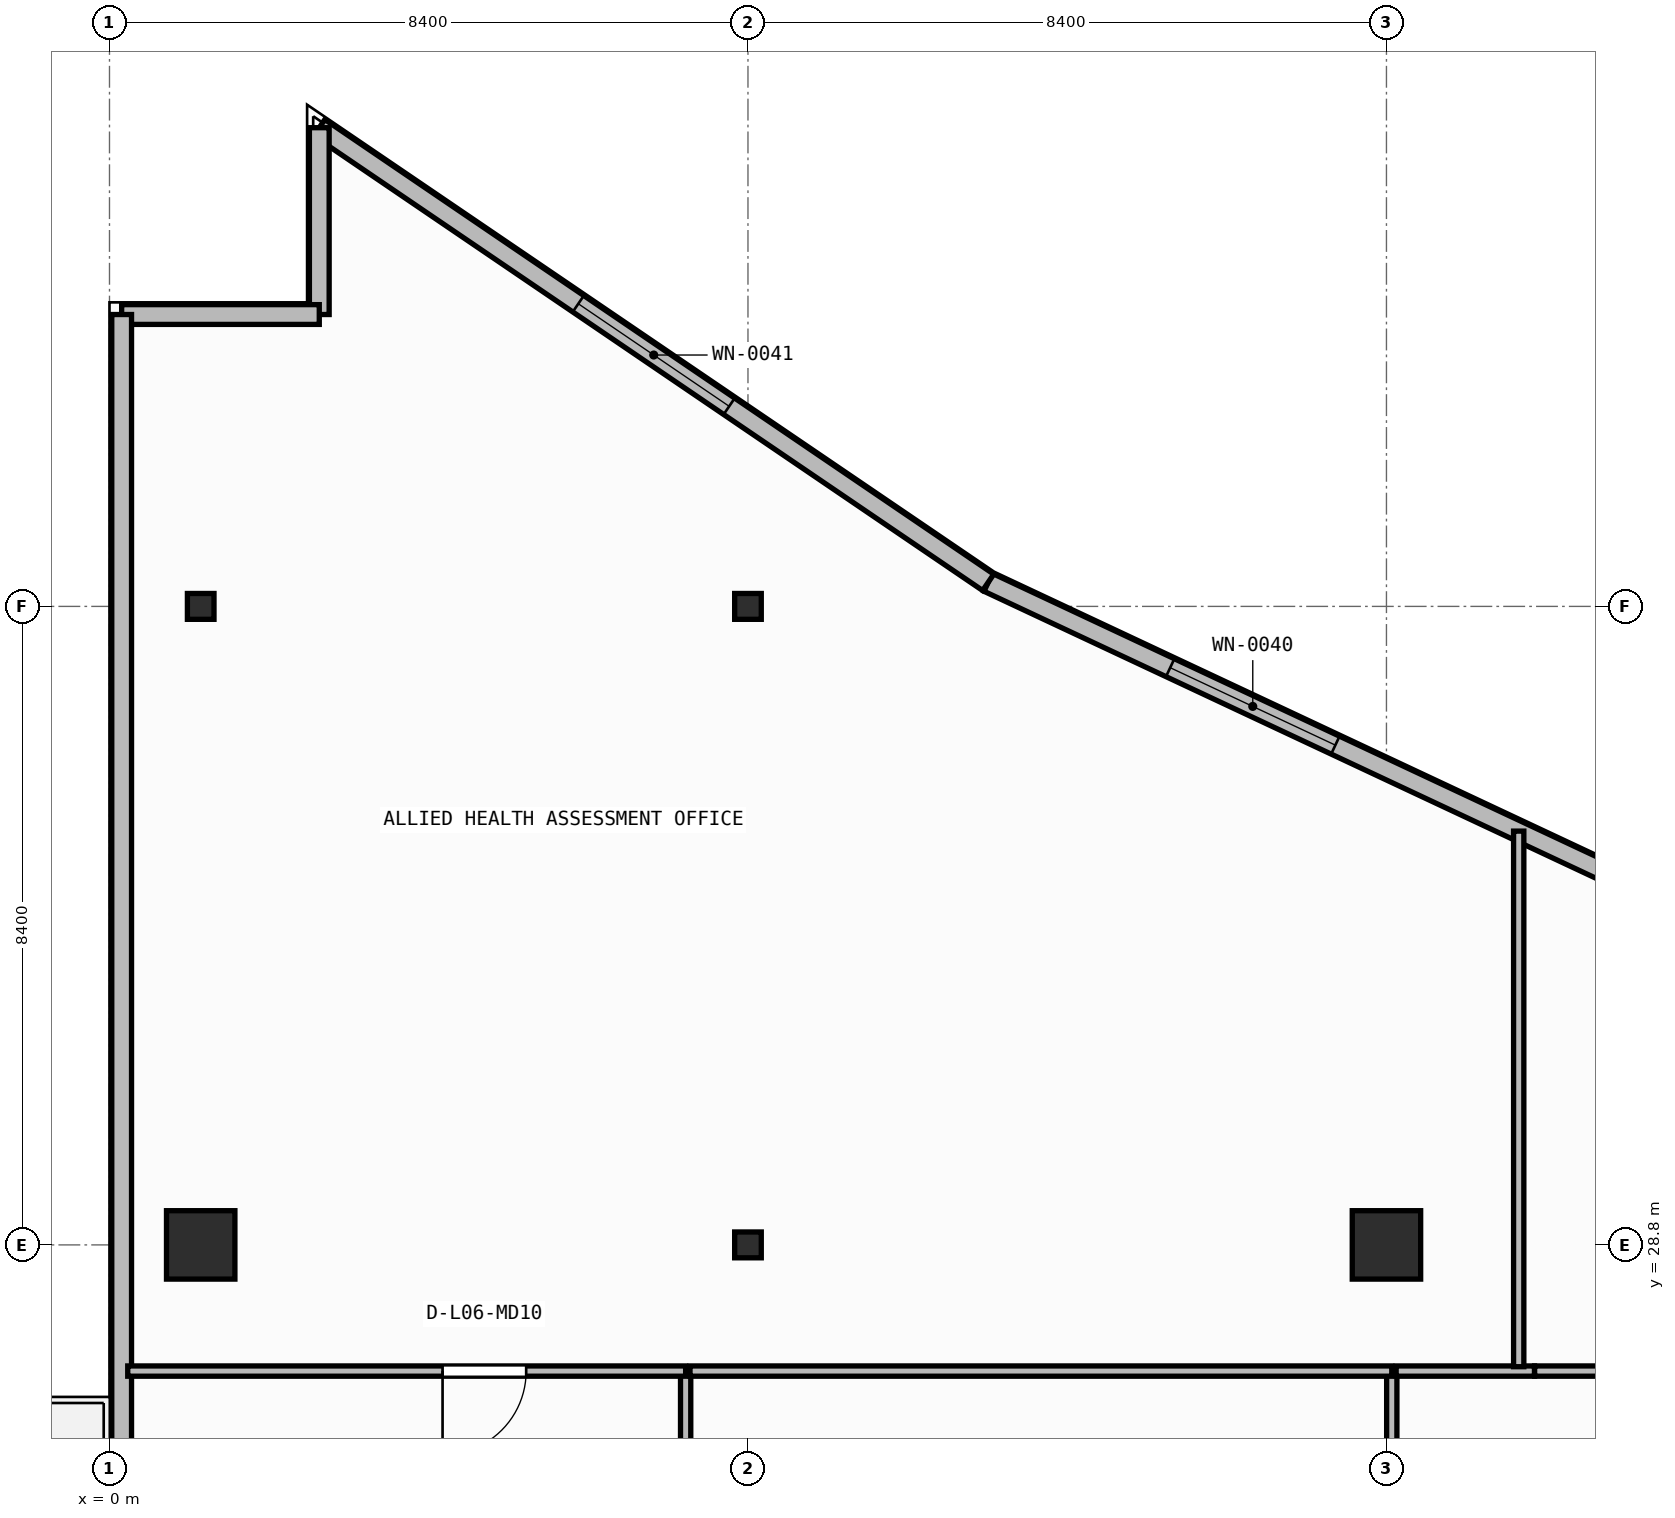
"""IFC4 building model, lengths in metres.
Left out: names, types, materials, properties, quantities, classifications, styles, units other than length and angle.
Written with IfcOpenShell. Run it as: python <this file> out.ifc"""

import sys

from ifc_helpers import new_model, si_unit, direction, frame, frame_2d, origin, origin_2d, place, context, subcontext, project, spatial, rectangle, i_section, extrude, element, fill, save


model = new_model("IFC4")
c1 = context("Model", 3, precision=1e-05, world=origin(), true_north=direction((0.0, 1.0)))
c2 = subcontext(c1, "Body", "Model", "MODEL_VIEW")
j1 = project(units=[si_unit("LENGTHUNIT", "METRE"), si_unit("PLANEANGLEUNIT", "RADIAN")], contexts=[c1])
p1 = place(None, origin())
s1 = spatial("IfcSite", under=j1, at=p1, CompositionType="ELEMENT")
p2 = place(p1, origin())
s2 = spatial("IfcBuilding", under=s1, at=p2, CompositionType="ELEMENT")
p3 = place(p2, frame((0.0, 0.0, 26.45)))
s3 = spatial("IfcBuildingStorey", under=s2, at=p3, CompositionType="ELEMENT", Elevation=26.45)
p4 = place(p3, frame((1.2, 28.8, 0.0), z_axis=(0.0, 0.0, 1.0), x_axis=(1.0, 0.0, 0.0)))
e1 = element("IfcColumn", 1, at=p4, inside=s3, PredefinedType="COLUMN", context=c2, shape_type="SweptSolid", body=[
    extrude(rectangle(XDim=0.9, YDim=0.9, at=origin_2d()), origin(), (0.0, 0.0, 1.0), 3.95),
])
p5 = place(p3, frame((8.4, 28.8, 0.0), z_axis=(0.0, 0.0, 1.0), x_axis=(1.0, 0.0, 0.0)))
e2 = element("IfcColumn", 2, at=p5, inside=s3, PredefinedType="COLUMN", context=c2, shape_type="SweptSolid", body=[
    extrude(i_section(OverallWidth=0.35, OverallDepth=0.34, WebThickness=0.016, FlangeThickness=0.028, at=origin_2d()), origin(), (0.0, 0.0, 1.0), 3.95),
])
p6 = place(p3, frame((16.8, 28.8, 0.0), z_axis=(0.0, 0.0, 1.0), x_axis=(1.0, 0.0, 0.0)))
e3 = element("IfcColumn", 3, at=p6, inside=s3, PredefinedType="COLUMN", context=c2, shape_type="SweptSolid", body=[
    extrude(rectangle(XDim=0.9, YDim=0.9, at=origin_2d()), origin(), (0.0, 0.0, 1.0), 3.95),
])
for number, where, z_axis, x_axis in (
    (4, (1.2, 37.2, 0.0), (0.0, 0.0, 1.0), (1.0, 0.0, 0.0)),
    (5, (8.4, 37.2, 0.0), (0.0, 0.0, 1.0), (1.0, 0.0, 0.0)),
):
    element("IfcColumn", number, at=place(p3, frame(where, z_axis=z_axis, x_axis=x_axis)), inside=s3, PredefinedType="COLUMN", context=c2, shape_type="SweptSolid", body=[
        extrude(i_section(OverallWidth=0.35, OverallDepth=0.34, WebThickness=0.016, FlangeThickness=0.028, at=origin_2d()), origin(), (0.0, 0.0, 1.0), 3.95),
    ])
p7 = place(p3, frame((24.408, 31.492, 0.0), z_axis=(0.0, 0.0, 1.0), x_axis=(-0.905396522918, 0.424566998585, 0.0)))
e6 = element("IfcWall", 6, at=p7, inside=s3, PredefinedType="STANDARD", context=c2, shape_type="SweptSolid", body=[
    extrude(rectangle(XDim=14.189, YDim=0.26, at=frame_2d((7.095, 0.0))), origin(), (0.0, 0.0, 1.0), 3.71),
])
p8 = place(p7, frame((9.145, 0.0, 0.9)))
e7 = element("IfcOpeningElement", 7, at=p8, cuts=e6, PredefinedType="OPENING", context=c2, shape_type="SweptSolid", body=[
    extrude(rectangle(XDim=2.4, YDim=1.65, at=frame_2d((1.2, 0.825))), frame((0.0, 0.14, 0.0), z_axis=(0.0, -1.0, 0.0), x_axis=(1.0, 0.0, 0.0)), (0.0, 0.0, 1.0), 0.28),
])
p9 = place(p3, frame((11.561, 37.517, 0.0), z_axis=(0.0, 0.0, 1.0), x_axis=(-0.827064743936, 0.562106670782, 0.0)))
e8 = element("IfcWall", 8, at=p9, inside=s3, PredefinedType="STANDARD", context=c2, shape_type="SweptSolid", body=[
    extrude(rectangle(XDim=10.641, YDim=0.26, at=frame_2d((5.32, 0.0))), origin(), (0.0, 0.0, 1.0), 3.71),
])
p10 = place(p9, frame((4.12, 0.0, 0.9)))
e9 = element("IfcOpeningElement", 9, at=p10, cuts=e8, PredefinedType="OPENING", context=c2, shape_type="SweptSolid", body=[
    extrude(rectangle(XDim=2.4, YDim=1.65, at=frame_2d((1.2, 0.825))), frame((0.0, 0.14, 0.0), z_axis=(0.0, -1.0, 0.0), x_axis=(1.0, 0.0, 0.0)), (0.0, 0.0, 1.0), 0.28),
])
p11 = place(p3, frame((2.76, 43.498, 0.0), z_axis=(0.0, 0.0, 1.0), x_axis=(0.0, -1.0, 0.0)))
e10 = element("IfcWall", 10, at=p11, inside=s3, PredefinedType="STANDARD", context=c2, shape_type="SweptSolid", body=[
    extrude(rectangle(XDim=2.458, YDim=0.26, at=frame_2d((1.229, 0.0))), origin(), (0.0, 0.0, 1.0), 3.71),
])
p12 = place(p3, frame((2.76, 41.04, 0.0), z_axis=(0.0, 0.0, 1.0), x_axis=(-1.0, 0.0, 0.0)))
e11 = element("IfcWall", 11, at=p12, inside=s3, PredefinedType="STANDARD", context=c2, shape_type="SweptSolid", body=[
    extrude(rectangle(XDim=2.6, YDim=0.26, at=frame_2d((1.3, 0.0))), origin(), (0.0, 0.0, 1.0), 3.71),
])
p13 = place(p3, frame((0.16, 41.04, 0.0), z_axis=(0.0, 0.0, 1.0), x_axis=(0.0, -1.0, 0.0)))
e12 = element("IfcWall", 12, at=p13, inside=s3, PredefinedType="STANDARD", context=c2, shape_type="SweptSolid", body=[
    extrude(rectangle(XDim=38.28, YDim=0.26, at=frame_2d((19.14, 0.0))), origin(), (0.0, 0.0, 1.0), 3.71),
])
p14 = place(p13, frame((22.743, 0.0, 0.0)))
e13 = element("IfcOpeningElement", 13, at=p14, cuts=e12, PredefinedType="OPENING", context=c2, shape_type="SweptSolid", body=[
    extrude(rectangle(XDim=1.3, YDim=2.15, at=frame_2d((0.65, 1.075))), frame((0.0, 0.14, 0.0), z_axis=(0.0, -1.0, 0.0), x_axis=(1.0, 0.0, 0.0)), (0.0, 0.0, 1.0), 0.28),
])
p15 = place(p3, frame((7.58, 20.698, 0.0), z_axis=(0.0, 0.0, 1.0), x_axis=(0.0, 1.0, 0.0)))
e14 = element("IfcWall", 14, at=p15, inside=s3, PredefinedType="PARTITIONING", context=c2, shape_type="SweptSolid", body=[
    extrude(rectangle(XDim=6.442, YDim=0.135, at=frame_2d((3.221, 0.0))), origin(), (0.0, 0.0, 1.0), 3.71),
])
p16 = place(p3, frame((7.58, 27.14, 0.0), z_axis=(0.0, 0.0, 1.0), x_axis=(-1.0, 0.0, 0.0)))
e15 = element("IfcWall", 15, at=p16, inside=s3, PredefinedType="PARTITIONING", context=c2, shape_type="SweptSolid", body=[
    extrude(rectangle(XDim=7.34, YDim=0.135, at=frame_2d((3.67, 0.0))), origin(), (0.0, 0.0, 1.0), 3.71),
])
p17 = place(p16, frame((2.098, 0.0, 0.0)))
e16 = element("IfcOpeningElement", 16, at=p17, cuts=e15, PredefinedType="OPENING", context=c2, shape_type="SweptSolid", body=[
    extrude(rectangle(XDim=1.1, YDim=2.1, at=frame_2d((0.55, 1.05))), frame((0.0, 0.077, 0.0), z_axis=(0.0, -1.0, 0.0), x_axis=(1.0, 0.0, 0.0)), (0.0, 0.0, 1.0), 0.155),
])
p18 = place(p3, frame((16.87, 19.95, 0.0), z_axis=(0.0, 0.0, 1.0), x_axis=(0.0, 1.0, 0.0)))
e17 = element("IfcWall", 17, at=p18, inside=s3, PredefinedType="PARTITIONING", context=c2, shape_type="SweptSolid", body=[
    extrude(rectangle(XDim=7.19, YDim=0.135, at=frame_2d((3.595, 0.0))), origin(), (0.0, 0.0, 1.0), 3.073),
])
p19 = place(p3, frame((16.87, 27.14, 0.0), z_axis=(0.0, 0.0, 1.0), x_axis=(-1.0, 0.0, 0.0)))
e18 = element("IfcWall", 18, at=p19, inside=s3, PredefinedType="PARTITIONING", context=c2, shape_type="SweptSolid", body=[
    extrude(rectangle(XDim=9.233, YDim=0.135, at=frame_2d((4.616, 0.0))), origin(), (0.0, 0.0, 1.0), 3.71),
])
p20 = place(p3, frame((18.748, 27.14, 0.0), z_axis=(0.0, 0.0, 1.0), x_axis=(-1.0, 0.0, 0.0)))
e19 = element("IfcWall", 19, at=p20, inside=s3, PredefinedType="PARTITIONING", context=c2, shape_type="SweptSolid", body=[
    extrude(rectangle(XDim=1.82, YDim=0.135, at=frame_2d((0.91, 0.0))), origin(), (0.0, 0.0, 1.0), 3.71),
])
p21 = place(p3, frame((36.32, 27.14, 0.0), z_axis=(0.0, 0.0, 1.0), x_axis=(-1.0, 0.0, 0.0)))
e20 = element("IfcWall", 20, at=p21, inside=s3, PredefinedType="PARTITIONING", context=c2, shape_type="SweptSolid", body=[
    extrude(rectangle(XDim=17.571, YDim=0.135, at=frame_2d((8.785, 0.0))), origin(), (0.0, 0.0, 1.0), 3.71),
])
p22 = place(p21, frame((14.663, 0.0, 0.0)))
e21 = element("IfcOpeningElement", 21, at=p22, cuts=e20, PredefinedType="OPENING", context=c2, shape_type="SweptSolid", body=[
    extrude(rectangle(XDim=1.1, YDim=2.1, at=frame_2d((0.55, 1.05))), frame((0.0, 0.077, 0.0), z_axis=(0.0, -1.0, 0.0), x_axis=(1.0, 0.0, 0.0)), (0.0, 0.0, 1.0), 0.155),
])
p23 = place(p3, frame((18.54, 27.198, 0.0), z_axis=(0.0, 0.0, 1.0), x_axis=(0.0, 1.0, 0.0)))
e22 = element("IfcWall", 22, at=p23, inside=s3, PredefinedType="PARTITIONING", context=c2, shape_type="SweptSolid", body=[
    extrude(rectangle(XDim=7.046, YDim=0.135, at=frame_2d((3.523, 0.0))), origin(), (0.0, 0.0, 1.0), 3.71),
])
p24 = place(p8, origin())
e23 = element("IfcWindow", 23, at=p24, inside=s3, PartitioningType="SINGLE_PANEL", PredefinedType="WINDOW", context=c2, shape_type="SweptSolid", body=[
    extrude(rectangle(XDim=2.4, YDim=1.65, at=frame_2d((1.2, 0.825))), frame((0.0, 0.03, 0.0), z_axis=(0.0, -1.0, 0.0), x_axis=(1.0, 0.0, 0.0)), (0.0, 0.0, 1.0), 0.06),
])
fill(e7, e23)
p25 = place(p10, origin())
e24 = element("IfcWindow", 24, at=p25, inside=s3, PartitioningType="SINGLE_PANEL", PredefinedType="WINDOW", context=c2, shape_type="SweptSolid", body=[
    extrude(rectangle(XDim=2.4, YDim=1.65, at=frame_2d((1.2, 0.825))), frame((0.0, 0.03, 0.0), z_axis=(0.0, -1.0, 0.0), x_axis=(1.0, 0.0, 0.0)), (0.0, 0.0, 1.0), 0.06),
])
fill(e9, e24)
p26 = place(p17, origin())
e25 = element("IfcDoor", 25, at=p26, inside=s3, OperationType="SINGLE_SWING_RIGHT", PredefinedType="DOOR", context=c2, shape_type="SweptSolid", body=[
    extrude(rectangle(XDim=1.1, YDim=2.1, at=frame_2d((0.55, 1.05))), frame((0.0, 0.025, 0.0), z_axis=(0.0, -1.0, 0.0), x_axis=(1.0, 0.0, 0.0)), (0.0, 0.0, 1.0), 0.05),
])
fill(e16, e25)
save(model, sys.argv[1])
